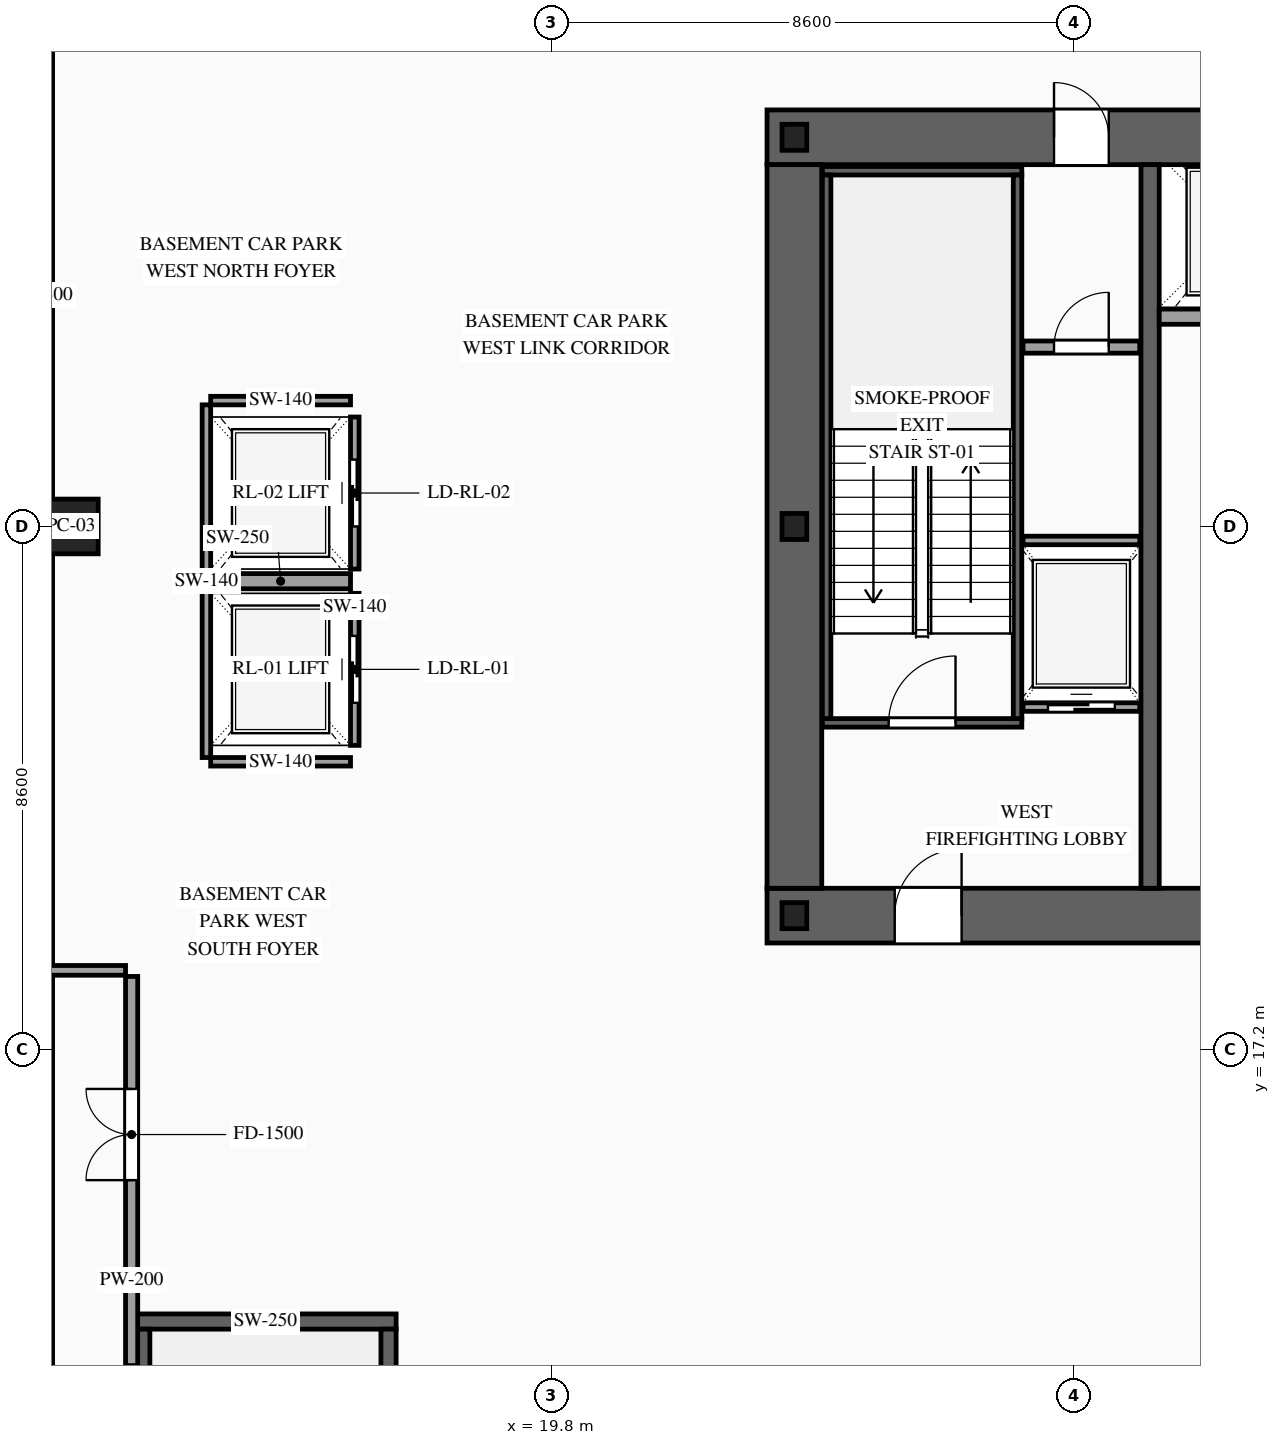
"""IFC4 building model, lengths in metres.
Left out: names, types, materials, properties, quantities, classifications, styles, units other than length and angle.
Written with IfcOpenShell. Run it as: python <this file> out.ifc"""

import sys

from ifc_helpers import new_model, si_unit, direction, frame, frame_2d, origin, origin_2d, place, context, subcontext, project, spatial, rectangle, i_section, extrude, source, transform, mapped, element, fill, save


model = new_model("IFC4")
c1 = context("Model", 3, precision=1e-05, world=origin(), true_north=direction((0.0, 1.0)))
c2 = subcontext(c1, "Body", "Model", "MODEL_VIEW")
j1 = project(units=[si_unit("LENGTHUNIT", "METRE"), si_unit("PLANEANGLEUNIT", "RADIAN")], contexts=[c1])
p1 = place(None, origin())
s1 = spatial("IfcSite", under=j1, at=p1, CompositionType="ELEMENT")
p2 = place(p1, origin())
s2 = spatial("IfcBuilding", under=s1, at=p2, CompositionType="ELEMENT")
p3 = place(p2, frame((0.0, 0.0, -4.5)))
s3 = spatial("IfcBuildingStorey", under=s2, at=p3, CompositionType="ELEMENT", Elevation=-4.5)
p4 = place(p3, frame((23.35, 19.4, 0.0), z_axis=(0.0, 0.0, 1.0), x_axis=(1.0, 0.0, 0.0)))
e1 = element("IfcWall", 1, at=p4, inside=s3, PredefinedType="SHEAR", context=c2, shape_type="SweptSolid", body=[
    extrude(rectangle(XDim=27.3, YDim=0.9, at=frame_2d((13.65, 0.0))), origin(), (0.0, 0.0, 1.0), 4.5),
])
p5 = place(p4, frame((2.1, 0.0, 0.0)))
e2 = element("IfcOpeningElement", 2, at=p5, cuts=e1, PredefinedType="OPENING", context=c2, shape_type="SweptSolid", body=[
    extrude(rectangle(XDim=1.1, YDim=2.2, at=frame_2d((0.55, 1.1))), frame((0.0, 0.465, 0.0), z_axis=(0.0, -1.0, 0.0), x_axis=(1.0, 0.0, 0.0)), (0.0, 0.0, 1.0), 0.93),
])
p6 = place(p4, frame((10.0, 0.0, 0.0)))
e3 = element("IfcOpeningElement", 3, at=p6, cuts=e1, PredefinedType="OPENING", context=c2, shape_type="SweptSolid", body=[
    extrude(rectangle(XDim=1.1, YDim=2.2, at=frame_2d((0.55, 1.1))), frame((0.0, 0.465, 0.0), z_axis=(0.0, -1.0, 0.0), x_axis=(1.0, 0.0, 0.0)), (0.0, 0.0, 1.0), 0.93),
])
p7 = place(p4, frame((23.2, 0.0, 0.0)))
e4 = element("IfcOpeningElement", 4, at=p7, cuts=e1, PredefinedType="OPENING", context=c2, shape_type="SweptSolid", body=[
    extrude(rectangle(XDim=1.1, YDim=2.2, at=frame_2d((0.55, 1.1))), frame((0.0, 0.465, 0.0), z_axis=(0.0, -1.0, 0.0), x_axis=(1.0, 0.0, 0.0)), (0.0, 0.0, 1.0), 0.93),
])
p8 = place(p4, frame((19.82, 0.0, 0.0)))
e5 = element("IfcOpeningElement", 5, at=p8, cuts=e1, PredefinedType="OPENING", context=c2, shape_type="SweptSolid", body=[
    extrude(rectangle(XDim=0.9, YDim=2.15, at=frame_2d((0.45, 1.075))), frame((0.0, 0.465, 0.0), z_axis=(0.0, -1.0, 0.0), x_axis=(1.0, 0.0, 0.0)), (0.0, 0.0, 1.0), 0.93),
])
p9 = place(p4, frame((18.38, 0.0, 0.0)))
e6 = element("IfcOpeningElement", 6, at=p9, cuts=e1, PredefinedType="OPENING", context=c2, shape_type="SweptSolid", body=[
    extrude(rectangle(XDim=0.9, YDim=2.15, at=frame_2d((0.45, 1.075))), frame((0.0, 0.465, 0.0), z_axis=(0.0, -1.0, 0.0), x_axis=(1.0, 0.0, 0.0)), (0.0, 0.0, 1.0), 0.93),
])
p10 = place(p3, frame((23.35, 32.2, 0.0), z_axis=(0.0, 0.0, 1.0), x_axis=(1.0, 0.0, 0.0)))
e7 = element("IfcWall", 7, at=p10, inside=s3, PredefinedType="SHEAR", context=c2, shape_type="SweptSolid", body=[
    extrude(rectangle(XDim=27.3, YDim=0.9, at=frame_2d((13.65, 0.0))), origin(), (0.0, 0.0, 1.0), 4.5),
])
p11 = place(p10, frame((4.72, 0.0, 0.0)))
e8 = element("IfcOpeningElement", 8, at=p11, cuts=e7, PredefinedType="OPENING", context=c2, shape_type="SweptSolid", body=[
    extrude(rectangle(XDim=0.9, YDim=2.15, at=frame_2d((0.45, 1.075))), frame((0.0, 0.465, 0.0), z_axis=(0.0, -1.0, 0.0), x_axis=(1.0, 0.0, 0.0)), (0.0, 0.0, 1.0), 0.93),
])
p12 = place(p10, frame((10.0, 0.0, 0.0)))
e9 = element("IfcOpeningElement", 9, at=p12, cuts=e7, PredefinedType="OPENING", context=c2, shape_type="SweptSolid", body=[
    extrude(rectangle(XDim=1.1, YDim=2.2, at=frame_2d((0.55, 1.1))), frame((0.0, 0.465, 0.0), z_axis=(0.0, -1.0, 0.0), x_axis=(1.0, 0.0, 0.0)), (0.0, 0.0, 1.0), 0.93),
])
p13 = place(p10, frame((15.85, 0.0, 0.0)))
e10 = element("IfcOpeningElement", 10, at=p13, cuts=e7, PredefinedType="OPENING", context=c2, shape_type="SweptSolid", body=[
    extrude(rectangle(XDim=1.1, YDim=2.2, at=frame_2d((0.55, 1.1))), frame((0.0, 0.465, 0.0), z_axis=(0.0, -1.0, 0.0), x_axis=(1.0, 0.0, 0.0)), (0.0, 0.0, 1.0), 0.93),
])
p14 = place(p10, frame((19.05, 0.0, 0.0)))
e11 = element("IfcOpeningElement", 11, at=p14, cuts=e7, PredefinedType="OPENING", context=c2, shape_type="SweptSolid", body=[
    extrude(rectangle(XDim=0.9, YDim=2.15, at=frame_2d((0.45, 1.075))), frame((0.0, 0.465, 0.0), z_axis=(0.0, -1.0, 0.0), x_axis=(1.0, 0.0, 0.0)), (0.0, 0.0, 1.0), 0.93),
])
m1 = source(origin(), c2, "Body", "SweptSolid", [
    extrude(rectangle(XDim=11.9, YDim=0.9, at=frame_2d((5.95, 0.0))), origin(), (0.0, 0.0, 1.0), 4.5),
])
p15 = place(p3, frame((23.8, 19.85, 0.0), z_axis=(0.0, 0.0, 1.0), x_axis=(0.0, 1.0, 0.0)))
e12 = element("IfcWall", 12, at=p15, inside=s3, PredefinedType="SHEAR", context=c2, shape_type="MappedRepresentation", body=[
    mapped(m1, transform((0.0, 0.0, 0.0), scale=1.0)),
])
m2 = source(origin(), c2, "Body", "SweptSolid", [
    extrude(rectangle(XDim=11.9, YDim=0.3, at=frame_2d((5.95, 0.0))), origin(), (0.0, 0.0, 1.0), 4.5),
])
p16 = place(p3, frame((29.65, 19.85, 0.0), z_axis=(0.0, 0.0, 1.0), x_axis=(0.0, 1.0, 0.0)))
e13 = element("IfcWall", 13, at=p16, inside=s3, PredefinedType="SOLIDWALL", context=c2, shape_type="MappedRepresentation", body=[
    mapped(m2, transform((0.0, 0.0, 0.0), scale=1.0)),
])
m3 = source(origin(), c2, "Body", "SweptSolid", [
    extrude(i_section(OverallWidth=0.407, OverallDepth=0.428, WebThickness=0.02, FlangeThickness=0.035, at=origin_2d()), origin(), (0.0, 0.0, 1.0), 4.5),
])
for number, where, z_axis, x_axis in (
    (14, (23.8, 19.4, 0.0), (0.0, 0.0, 1.0), (1.0, 0.0, 0.0)),
    (15, (23.8, 25.8, 0.0), (0.0, 0.0, 1.0), (1.0, 0.0, 0.0)),
    (16, (23.8, 32.2, 0.0), (0.0, 0.0, 1.0), (1.0, 0.0, 0.0)),
):
    element("IfcColumn", number, at=place(p3, frame(where, z_axis=z_axis, x_axis=x_axis)), inside=s3, PredefinedType="COLUMN", context=c2, shape_type="MappedRepresentation", body=[
        mapped(m3, transform((0.0, 0.0, 0.0), scale=1.0)),
    ])
m4 = source(origin(), c2, "Body", "SweptSolid", [
    extrude(rectangle(XDim=0.9, YDim=0.9, at=origin_2d()), origin(), (0.0, 0.0, 1.0), 4.5),
])
p17 = place(p3, frame((11.9, 25.8, 0.0), z_axis=(0.0, 0.0, 1.0), x_axis=(1.0, 0.0, 0.0)))
e17 = element("IfcColumn", 17, at=p17, inside=s3, PredefinedType="COLUMN", context=c2, shape_type="MappedRepresentation", body=[
    mapped(m4, transform((0.0, 0.0, 0.0), scale=1.0)),
])
p18 = place(p3, frame((27.56, 22.83, 0.0), z_axis=(0.0, 0.0, 1.0), x_axis=(1.0, 0.0, 0.0)))
e18 = element("IfcWall", 18, at=p18, inside=s3, PredefinedType="SOLIDWALL", context=c2, shape_type="SweptSolid", body=[
    extrude(rectangle(XDim=1.92, YDim=0.14, at=frame_2d((0.96, 0.0))), origin(), (0.0, 0.0, 1.0), 4.2),
])
p19 = place(p18, frame((0.41, 0.0, 0.0)))
e19 = element("IfcOpeningElement", 19, at=p19, cuts=e18, PredefinedType="OPENING", context=c2, shape_type="SweptSolid", body=[
    extrude(rectangle(XDim=1.1, YDim=2.2, at=frame_2d((0.55, 1.1))), frame((0.0, 0.085, 0.0), z_axis=(0.0, -1.0, 0.0), x_axis=(1.0, 0.0, 0.0)), (0.0, 0.0, 1.0), 0.17),
])
m5 = source(origin(), c2, "Body", "SweptSolid", [
    extrude(rectangle(XDim=1.92, YDim=0.14, at=frame_2d((0.96, 0.0))), origin(), (0.0, 0.0, 1.0), 4.2),
])
p20 = place(p3, frame((27.56, 25.57, 0.0), z_axis=(0.0, 0.0, 1.0), x_axis=(1.0, 0.0, 0.0)))
e20 = element("IfcWall", 20, at=p20, inside=s3, PredefinedType="SOLIDWALL", context=c2, shape_type="MappedRepresentation", body=[
    mapped(m5, transform((0.0, 0.0, 0.0), scale=1.0)),
])
m6 = source(origin(), c2, "Body", "SweptSolid", [
    extrude(rectangle(XDim=2.5, YDim=0.25, at=frame_2d((1.25, 0.0))), origin(), (0.0, 0.0, 1.0), 4.2),
])
p21 = place(p3, frame((29.8, 29.25, 0.0), z_axis=(0.0, 0.0, 1.0), x_axis=(1.0, 0.0, 0.0)))
e21 = element("IfcWall", 21, at=p21, inside=s3, PredefinedType="SOLIDWALL", context=c2, shape_type="MappedRepresentation", body=[
    mapped(m6, transform((0.0, 0.0, 0.0), scale=1.0)),
])
p22 = place(p3, frame((16.57, 22.2, 0.0), z_axis=(0.0, 0.0, 1.0), x_axis=(0.0, 1.0, 0.0)))
e22 = element("IfcWall", 22, at=p22, inside=s3, PredefinedType="SOLIDWALL", context=c2, shape_type="SweptSolid", body=[
    extrude(rectangle(XDim=2.5, YDim=0.14, at=frame_2d((1.25, 0.0))), origin(), (0.0, 0.0, 1.0), 4.2),
])
p23 = place(p22, frame((0.7, 0.0, 0.0)))
e23 = element("IfcOpeningElement", 23, at=p23, cuts=e22, PredefinedType="OPENING", context=c2, shape_type="SweptSolid", body=[
    extrude(rectangle(XDim=1.1, YDim=2.2, at=frame_2d((0.55, 1.1))), frame((0.0, 0.085, 0.0), z_axis=(0.0, -1.0, 0.0), x_axis=(1.0, 0.0, 0.0)), (0.0, 0.0, 1.0), 0.17),
])
m7 = source(origin(), c2, "Body", "SweptSolid", [
    extrude(rectangle(XDim=2.3, YDim=0.25, at=frame_2d((1.15, 0.0))), origin(), (0.0, 0.0, 1.0), 4.2),
])
p24 = place(p3, frame((14.2, 24.9, 0.0), z_axis=(0.0, 0.0, 1.0), x_axis=(1.0, 0.0, 0.0)))
e24 = element("IfcWall", 24, at=p24, inside=s3, PredefinedType="SOLIDWALL", context=c2, shape_type="MappedRepresentation", body=[
    mapped(m7, transform((0.0, 0.0, 0.0), scale=1.0)),
])
m8 = source(origin(), c2, "Body", "SweptSolid", [
    extrude(rectangle(XDim=5.8, YDim=0.14, at=frame_2d((2.9, 0.0))), origin(), (0.0, 0.0, 1.0), 4.2),
])
p25 = place(p3, frame((14.13, 22.0, 0.0), z_axis=(0.0, 0.0, 1.0), x_axis=(0.0, 1.0, 0.0)))
e25 = element("IfcWall", 25, at=p25, inside=s3, PredefinedType="SOLIDWALL", context=c2, shape_type="MappedRepresentation", body=[
    mapped(m8, transform((0.0, 0.0, 0.0), scale=1.0)),
])
m9 = source(origin(), c2, "Body", "SweptSolid", [
    extrude(rectangle(XDim=2.3, YDim=0.14, at=frame_2d((1.15, 0.0))), origin(), (0.0, 0.0, 1.0), 4.2),
])
p26 = place(p3, frame((14.2, 21.93, 0.0), z_axis=(0.0, 0.0, 1.0), x_axis=(1.0, 0.0, 0.0)))
e26 = element("IfcWall", 26, at=p26, inside=s3, PredefinedType="SOLIDWALL", context=c2, shape_type="MappedRepresentation", body=[
    mapped(m9, transform((0.0, 0.0, 0.0), scale=1.0)),
])
p27 = place(p3, frame((16.57, 25.1, 0.0), z_axis=(0.0, 0.0, 1.0), x_axis=(0.0, 1.0, 0.0)))
e27 = element("IfcWall", 27, at=p27, inside=s3, PredefinedType="SOLIDWALL", context=c2, shape_type="SweptSolid", body=[
    extrude(rectangle(XDim=2.5, YDim=0.14, at=frame_2d((1.25, 0.0))), origin(), (0.0, 0.0, 1.0), 4.2),
])
p28 = place(p27, frame((0.7, 0.0, 0.0)))
e28 = element("IfcOpeningElement", 28, at=p28, cuts=e27, PredefinedType="OPENING", context=c2, shape_type="SweptSolid", body=[
    extrude(rectangle(XDim=1.1, YDim=2.2, at=frame_2d((0.55, 1.1))), frame((0.0, 0.085, 0.0), z_axis=(0.0, -1.0, 0.0), x_axis=(1.0, 0.0, 0.0)), (0.0, 0.0, 1.0), 0.17),
])
p29 = place(p3, frame((14.2, 27.87, 0.0), z_axis=(0.0, 0.0, 1.0), x_axis=(1.0, 0.0, 0.0)))
e29 = element("IfcWall", 29, at=p29, inside=s3, PredefinedType="SOLIDWALL", context=c2, shape_type="MappedRepresentation", body=[
    mapped(m9, transform((0.0, 0.0, 0.0), scale=1.0)),
])
p30 = place(p3, frame((24.26, 22.57, 0.0), z_axis=(0.0, 0.0, 1.0), x_axis=(1.0, 0.0, 0.0)))
e30 = element("IfcWall", 30, at=p30, inside=s3, PredefinedType="SOLIDWALL", context=c2, shape_type="SweptSolid", body=[
    extrude(rectangle(XDim=3.28, YDim=0.14, at=frame_2d((1.64, 0.0))), origin(), (0.0, 0.0, 1.0), 4.2),
])
p31 = place(p30, frame((1.09, 0.0, 0.0)))
e31 = element("IfcOpeningElement", 31, at=p31, cuts=e30, PredefinedType="OPENING", context=c2, shape_type="SweptSolid", body=[
    extrude(rectangle(XDim=1.1, YDim=2.2, at=frame_2d((0.55, 1.1))), frame((0.0, 0.085, 0.0), z_axis=(0.0, -1.0, 0.0), x_axis=(1.0, 0.0, 0.0)), (0.0, 0.0, 1.0), 0.17),
])
m10 = source(origin(), c2, "Body", "SweptSolid", [
    extrude(rectangle(XDim=3.28, YDim=0.14, at=frame_2d((1.64, 0.0))), origin(), (0.0, 0.0, 1.0), 4.2),
])
p32 = place(p3, frame((24.26, 31.65, 0.0), z_axis=(0.0, 0.0, 1.0), x_axis=(1.0, 0.0, 0.0)))
e32 = element("IfcWall", 32, at=p32, inside=s3, PredefinedType="SOLIDWALL", context=c2, shape_type="MappedRepresentation", body=[
    mapped(m10, transform((0.0, 0.0, 0.0), scale=1.0)),
])
m11 = source(origin(), c2, "Body", "SweptSolid", [
    extrude(rectangle(XDim=8.94, YDim=0.14, at=frame_2d((4.47, 0.0))), origin(), (0.0, 0.0, 1.0), 4.2),
])
for number, where, z_axis, x_axis in (
    (33, (24.33, 22.64, 0.0), (0.0, 0.0, 1.0), (0.0, 1.0, 0.0)),
    (34, (27.47, 22.64, 0.0), (0.0, 0.0, 1.0), (0.0, 1.0, 0.0)),
):
    element("IfcWall", number, at=place(p3, frame(where, z_axis=z_axis, x_axis=x_axis)), inside=s3, PredefinedType="SOLIDWALL", context=c2, shape_type="MappedRepresentation", body=[
        mapped(m11, transform((0.0, 0.0, 0.0), scale=1.0)),
    ])
m12 = source(origin(), c2, "Body", "SweptSolid", [
    extrude(rectangle(XDim=4.3, YDim=0.25, at=frame_2d((2.15, 0.0))), origin(), (0.0, 0.0, 1.0), 4.2),
])
p33 = place(p3, frame((12.95, 12.725, 0.0), z_axis=(0.0, 0.0, 1.0), x_axis=(1.0, 0.0, 0.0)))
e35 = element("IfcWall", 35, at=p33, inside=s3, PredefinedType="SOLIDWALL", context=c2, shape_type="MappedRepresentation", body=[
    mapped(m12, transform((0.0, 0.0, 0.0), scale=1.0)),
])
m13 = source(origin(), c2, "Body", "SweptSolid", [
    extrude(rectangle(XDim=9.6, YDim=0.25, at=frame_2d((4.8, 0.0))), origin(), (0.0, 0.0, 1.0), 4.2),
])
p34 = place(p3, frame((13.075, 3.0, 0.0), z_axis=(0.0, 0.0, 1.0), x_axis=(0.0, 1.0, 0.0)))
e36 = element("IfcWall", 36, at=p34, inside=s3, PredefinedType="SOLIDWALL", context=c2, shape_type="MappedRepresentation", body=[
    mapped(m13, transform((0.0, 0.0, 0.0), scale=1.0)),
])
p35 = place(p3, frame((17.125, 3.0, 0.0), z_axis=(0.0, 0.0, 1.0), x_axis=(0.0, 1.0, 0.0)))
e37 = element("IfcWall", 37, at=p35, inside=s3, PredefinedType="SOLIDWALL", context=c2, shape_type="SweptSolid", body=[
    extrude(rectangle(XDim=9.6, YDim=0.25, at=frame_2d((4.8, 0.0))), origin(), (0.0, 0.0, 1.0), 4.2),
])
p36 = place(p35, frame((0.35, 0.0, 0.0)))
e38 = element("IfcOpeningElement", 38, at=p36, cuts=e37, PredefinedType="OPENING", context=c2, shape_type="SweptSolid", body=[
    extrude(rectangle(XDim=1.1, YDim=2.2, at=frame_2d((0.55, 1.1))), frame((0.0, 0.14, 0.0), z_axis=(0.0, -1.0, 0.0), x_axis=(1.0, 0.0, 0.0)), (0.0, 0.0, 1.0), 0.28),
])
p37 = place(p3, frame((27.56, 28.75, 0.0), z_axis=(0.0, 0.0, 1.0), x_axis=(1.0, 0.0, 0.0)))
e39 = element("IfcWall", 39, at=p37, inside=s3, PredefinedType="PARTITIONING", context=c2, shape_type="SweptSolid", body=[
    extrude(rectangle(XDim=1.92, YDim=0.2, at=frame_2d((0.96, 0.0))), origin(), (0.0, 0.0, 1.0), 4.2),
])
p38 = place(p37, frame((0.51, 0.0, 0.0)))
e40 = element("IfcOpeningElement", 40, at=p38, cuts=e39, PredefinedType="OPENING", context=c2, shape_type="SweptSolid", body=[
    extrude(rectangle(XDim=0.9, YDim=2.15, at=frame_2d((0.45, 1.075))), frame((0.0, 0.115, 0.0), z_axis=(0.0, -1.0, 0.0), x_axis=(1.0, 0.0, 0.0)), (0.0, 0.0, 1.0), 0.23),
])
p39 = place(p3, frame((12.9, 12.0, 0.0), z_axis=(0.0, 0.0, 1.0), x_axis=(0.0, 1.0, 0.0)))
e41 = element("IfcWall", 41, at=p39, inside=s3, PredefinedType="PARTITIONING", context=c2, shape_type="SweptSolid", body=[
    extrude(rectangle(XDim=6.4, YDim=0.2, at=frame_2d((3.2, 0.0))), origin(), (0.0, 0.0, 1.0), 4.2),
])
p40 = place(p39, frame((3.05, 0.0, 0.0)))
e42 = element("IfcOpeningElement", 42, at=p40, cuts=e41, PredefinedType="OPENING", context=c2, shape_type="SweptSolid", body=[
    extrude(rectangle(XDim=1.5, YDim=2.3, at=frame_2d((0.75, 1.15))), frame((0.0, 0.115, 0.0), z_axis=(0.0, -1.0, 0.0), x_axis=(1.0, 0.0, 0.0)), (0.0, 0.0, 1.0), 0.23),
])
m14 = source(origin(), c2, "Body", "SweptSolid", [
    extrude(rectangle(XDim=10.62, YDim=0.16, at=frame_2d((5.31, 0.0))), origin(), (0.0, 0.0, 1.0), 4.2),
])
p41 = place(p3, frame((2.18, 18.5, 0.0), z_axis=(0.0, 0.0, 1.0), x_axis=(1.0, 0.0, 0.0)))
e43 = element("IfcWall", 43, at=p41, inside=s3, PredefinedType="PARTITIONING", context=c2, shape_type="MappedRepresentation", body=[
    mapped(m14, transform((0.0, 0.0, 0.0), scale=1.0)),
])
m15 = source(origin(), c2, "Body", "SweptSolid", [
    extrude(rectangle(XDim=1.1, YDim=2.2, at=frame_2d((0.55, 1.1))), frame((0.0, 0.025, 0.0), z_axis=(0.0, -1.0, 0.0), x_axis=(1.0, 0.0, 0.0)), (0.0, 0.0, 1.0), 0.05),
])
p42 = place(p19, origin())
e44 = element("IfcDoor", 44, at=p42, inside=s3, OperationType="SLIDING_TO_LEFT", PredefinedType="DOOR", context=c2, shape_type="MappedRepresentation", body=[
    mapped(m15, transform((0.0, 0.0, 0.0), scale=1.0)),
])
fill(e19, e44)
p43 = place(p23, origin())
e45 = element("IfcDoor", 45, at=p43, inside=s3, OperationType="SLIDING_TO_RIGHT", PredefinedType="DOOR", context=c2, shape_type="MappedRepresentation", body=[
    mapped(m15, transform((0.0, 0.0, 0.0), scale=1.0)),
])
fill(e23, e45)
p44 = place(p28, origin())
e46 = element("IfcDoor", 46, at=p44, inside=s3, OperationType="SLIDING_TO_LEFT", PredefinedType="DOOR", context=c2, shape_type="MappedRepresentation", body=[
    mapped(m15, transform((0.0, 0.0, 0.0), scale=1.0)),
])
fill(e28, e46)
m16 = source(origin(), c2, "Body", "SweptSolid", [
    extrude(rectangle(XDim=1.1, YDim=2.2, at=frame_2d((0.55, 1.1))), frame((0.0, 0.025, 0.0), z_axis=(0.0, -1.0, 0.0), x_axis=(1.0, 0.0, 0.0)), (0.0, 0.0, 1.0), 0.05),
])
p45 = place(p31, origin())
e47 = element("IfcDoor", 47, at=p45, inside=s3, OperationType="SINGLE_SWING_RIGHT", PredefinedType="DOOR", context=c2, shape_type="MappedRepresentation", body=[
    mapped(m16, transform((0.0, 0.0, 0.0), scale=1.0)),
])
fill(e31, e47)
p46 = place(p5, origin())
e48 = element("IfcDoor", 48, at=p46, inside=s3, OperationType="SINGLE_SWING_RIGHT", PredefinedType="DOOR", context=c2, shape_type="MappedRepresentation", body=[
    mapped(m16, transform((0.0, 0.0, 0.0), scale=1.0)),
])
fill(e2, e48)
m17 = source(origin(), c2, "Body", "SweptSolid", [
    extrude(rectangle(XDim=0.9, YDim=2.15, at=frame_2d((0.45, 1.075))), frame((0.0, 0.025, 0.0), z_axis=(0.0, -1.0, 0.0), x_axis=(1.0, 0.0, 0.0)), (0.0, 0.0, 1.0), 0.05),
])
p47 = place(p11, origin())
e49 = element("IfcDoor", 49, at=p47, inside=s3, OperationType="SINGLE_SWING_LEFT", PredefinedType="DOOR", context=c2, shape_type="MappedRepresentation", body=[
    mapped(m17, transform((0.0, 0.0, 0.0), scale=1.0)),
])
fill(e8, e49)
p48 = place(p38, origin())
e50 = element("IfcDoor", 50, at=p48, inside=s3, OperationType="SINGLE_SWING_RIGHT", PredefinedType="DOOR", context=c2, shape_type="MappedRepresentation", body=[
    mapped(m17, transform((0.0, 0.0, 0.0), scale=1.0)),
])
fill(e40, e50)
m18 = source(origin(), c2, "Body", "SweptSolid", [
    extrude(rectangle(XDim=1.5, YDim=2.3, at=frame_2d((0.75, 1.15))), frame((0.0, 0.025, 0.0), z_axis=(0.0, -1.0, 0.0), x_axis=(1.0, 0.0, 0.0)), (0.0, 0.0, 1.0), 0.05),
])
p49 = place(p40, origin())
e51 = element("IfcDoor", 51, at=p49, inside=s3, OperationType="DOUBLE_DOOR_SINGLE_SWING", PredefinedType="DOOR", context=c2, shape_type="MappedRepresentation", body=[
    mapped(m18, transform((0.0, 0.0, 0.0), scale=1.0)),
])
fill(e42, e51)
save(model, sys.argv[1])
